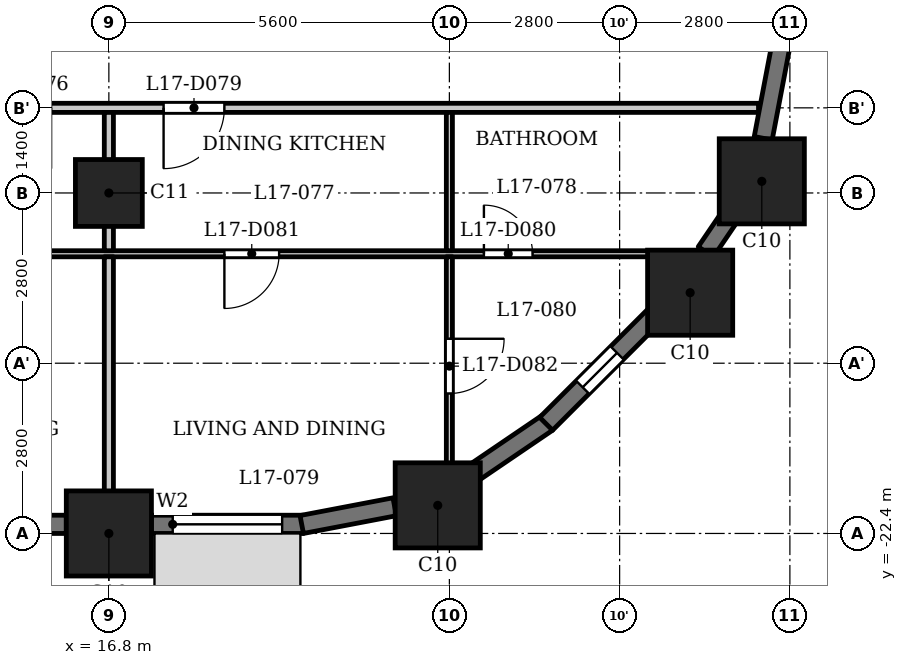
"""IFC4 building model, lengths in metres.
Left out: names, types, materials, properties, quantities, classifications, styles, units other than length and angle.
Written with IfcOpenShell. Run it as: python <this file> out.ifc"""

import sys

from ifc_helpers import new_model, si_unit, direction, frame, frame_2d, origin, origin_2d, place, context, subcontext, project, spatial, rectangle, extrude, element, fill, save


model = new_model("IFC4")
c1 = context("Model", 3, precision=1e-05, world=origin(), true_north=direction((0.0, 1.0)))
c2 = subcontext(c1, "Body", "Model", "MODEL_VIEW")
j1 = project(units=[si_unit("LENGTHUNIT", "METRE"), si_unit("PLANEANGLEUNIT", "RADIAN")], contexts=[c1])
p1 = place(None, origin())
s1 = spatial("IfcSite", under=j1, at=p1, CompositionType="ELEMENT")
p2 = place(p1, origin())
s2 = spatial("IfcBuilding", under=s1, at=p2, CompositionType="ELEMENT")
p3 = place(p2, frame((0.0, 0.0, 69.0)))
s3 = spatial("IfcBuildingStorey", under=s2, at=p3, CompositionType="ELEMENT", Elevation=69.0)
for number, where, z_axis, x_axis in (
    (1, (16.8, -22.4, 0.0), (0.0, 0.0, 1.0), (1.0, 0.0, 0.0)),
    (2, (22.209, -21.938, 0.0), (0.0, 0.0, 1.0), (1.0, 0.0, 0.0)),
    (3, (26.36, -18.44, 0.0), (0.0, 0.0, 1.0), (1.0, 0.0, 0.0)),
    (4, (27.538, -16.609, 0.0), (0.0, 0.0, 1.0), (1.0, 0.0, 0.0)),
):
    element("IfcColumn", number, at=place(p3, frame(where, z_axis=z_axis, x_axis=x_axis)), inside=s3, PredefinedType="COLUMN", context=c2, shape_type="SweptSolid", body=[
        extrude(rectangle(XDim=1.4, YDim=1.4, at=origin_2d()), origin(), (0.0, 0.0, 1.0), 3.5),
    ])
p4 = place(p3, frame((16.8, -16.8, 0.0), z_axis=(0.0, 0.0, 1.0), x_axis=(1.0, 0.0, 0.0)))
e5 = element("IfcColumn", 5, at=p4, inside=s3, PredefinedType="COLUMN", context=c2, shape_type="SweptSolid", body=[
    extrude(rectangle(XDim=1.1, YDim=1.1, at=origin_2d()), origin(), (0.0, 0.0, 1.0), 3.5),
])
p5 = place(p3, frame((11.9, -22.25, 0.0), z_axis=(0.0, 0.0, 1.0), x_axis=(1.0, 0.0, 0.0)))
e6 = element("IfcWall", 6, at=p5, inside=s3, PredefinedType="SOLIDWALL", context=c2, shape_type="SweptSolid", body=[
    extrude(rectangle(XDim=4.2, YDim=0.3, at=frame_2d((2.1, 0.0))), origin(), (0.0, 0.0, 1.0), 2.3),
])
p6 = place(p5, frame((0.3, 0.0, 1.2)))
e7 = element("IfcOpeningElement", 7, at=p6, cuts=e6, PredefinedType="OPENING", context=c2, shape_type="SweptSolid", body=[
    extrude(rectangle(XDim=3.6, YDim=0.95, at=frame_2d((1.8, 0.475))), frame((0.0, 0.16, 0.0), z_axis=(0.0, -1.0, 0.0), x_axis=(1.0, 0.0, 0.0)), (0.0, 0.0, 1.0), 0.32),
])
p7 = place(p3, frame((17.5, -22.25, 0.0), z_axis=(0.0, 0.0, 1.0), x_axis=(1.0, 0.0, 0.0)))
e8 = element("IfcWall", 8, at=p7, inside=s3, PredefinedType="SOLIDWALL", context=c2, shape_type="SweptSolid", body=[
    extrude(rectangle(XDim=2.5, YDim=0.3, at=frame_2d((1.25, 0.0))), origin(), (0.0, 0.0, 1.0), 2.3),
])
p8 = place(p7, frame((0.35, 0.0, 0.9)))
e9 = element("IfcOpeningElement", 9, at=p8, cuts=e8, PredefinedType="OPENING", context=c2, shape_type="SweptSolid", body=[
    extrude(rectangle(XDim=1.8, YDim=1.25, at=frame_2d((0.9, 0.625))), frame((0.0, 0.16, 0.0), z_axis=(0.0, -1.0, 0.0), x_axis=(1.0, 0.0, 0.0)), (0.0, 0.0, 1.0), 0.32),
])
p9 = place(p3, frame((19.972, -22.253, 0.0), z_axis=(0.0, 0.0, 1.0), x_axis=(0.982297345734, 0.187328386968, 0.0)))
e10 = element("IfcWall", 10, at=p9, inside=s3, PredefinedType="SOLIDWALL", context=c2, shape_type="SweptSolid", body=[
    extrude(rectangle(XDim=1.556, YDim=0.3, at=frame_2d((0.778, 0.0))), origin(), (0.0, 0.0, 1.0), 2.3),
])
p10 = place(p3, frame((22.726, -21.454, 0.0), z_axis=(0.0, 0.0, 1.0), x_axis=(0.827019875346, 0.562172683241, 0.0)))
e11 = element("IfcWall", 11, at=p10, inside=s3, PredefinedType="SOLIDWALL", context=c2, shape_type="SweptSolid", body=[
    extrude(rectangle(XDim=1.556, YDim=0.3, at=frame_2d((0.778, 0.0))), origin(), (0.0, 0.0, 1.0), 2.3),
])
p11 = place(p3, frame((23.991, -20.597, 0.0), z_axis=(0.0, 0.0, 1.0), x_axis=(0.707106781187, 0.707106781187, 0.0)))
e12 = element("IfcWall", 12, at=p11, inside=s3, PredefinedType="SOLIDWALL", context=c2, shape_type="SweptSolid", body=[
    extrude(rectangle(XDim=2.5, YDim=0.3, at=frame_2d((1.25, 0.0))), origin(), (0.0, 0.0, 1.0), 2.3),
])
p12 = place(p11, frame((0.85, 0.0, 0.6)))
e13 = element("IfcOpeningElement", 13, at=p12, cuts=e12, PredefinedType="OPENING", context=c2, shape_type="SweptSolid", body=[
    extrude(rectangle(XDim=0.8, YDim=1.55, at=frame_2d((0.4, 0.775))), frame((0.0, 0.16, 0.0), z_axis=(0.0, -1.0, 0.0), x_axis=(1.0, 0.0, 0.0)), (0.0, 0.0, 1.0), 0.32),
])
p13 = place(p3, frame((26.617, -17.769, 0.0), z_axis=(0.0, 0.0, 1.0), x_axis=(0.562000651531, 0.827136788977, 0.0)))
e14 = element("IfcWall", 14, at=p13, inside=s3, PredefinedType="SOLIDWALL", context=c2, shape_type="SweptSolid", body=[
    extrude(rectangle(XDim=0.777, YDim=0.3, at=frame_2d((0.389, 0.0))), origin(), (0.0, 0.0, 1.0), 3.15),
])
p14 = place(p3, frame((27.561, -15.9, 0.0), z_axis=(0.0, 0.0, 1.0), x_axis=(0.187328386968, 0.982297345734, 0.0)))
e15 = element("IfcWall", 15, at=p14, inside=s3, PredefinedType="SOLIDWALL", context=c2, shape_type="SweptSolid", body=[
    extrude(rectangle(XDim=1.556, YDim=0.3, at=frame_2d((0.778, 0.0))), origin(), (0.0, 0.0, 1.0), 2.3),
])
p15 = place(p3, frame((-26.394, -17.8, 0.0), z_axis=(0.0, 0.0, 1.0), x_axis=(1.0, 0.0, 0.0)))
e16 = element("IfcWall", 16, at=p15, inside=s3, PredefinedType="PARTITIONING", context=c2, shape_type="SweptSolid", body=[
    extrude(rectangle(XDim=53.034, YDim=0.1, at=frame_2d((26.517, 0.0))), origin(), (0.0, 0.0, 1.0), 3.15),
])
p16 = place(p15, frame((0.794, 0.0, 0.0)))
e17 = element("IfcOpeningElement", 17, at=p16, cuts=e16, PredefinedType="OPENING", context=c2, shape_type="SweptSolid", body=[
    extrude(rectangle(XDim=0.8, YDim=2.1, at=frame_2d((0.4, 1.05))), frame((0.0, 0.06, 0.0), z_axis=(0.0, -1.0, 0.0), x_axis=(1.0, 0.0, 0.0)), (0.0, 0.0, 1.0), 0.12),
])
p17 = place(p15, frame((5.644, 0.0, 0.0)))
e18 = element("IfcOpeningElement", 18, at=p17, cuts=e16, PredefinedType="OPENING", context=c2, shape_type="SweptSolid", body=[
    extrude(rectangle(XDim=0.9, YDim=2.1, at=frame_2d((0.45, 1.05))), frame((0.0, 0.06, 0.0), z_axis=(0.0, -1.0, 0.0), x_axis=(1.0, 0.0, 0.0)), (0.0, 0.0, 1.0), 0.12),
])
p18 = place(p15, frame((10.494, 0.0, 0.0)))
e19 = element("IfcOpeningElement", 19, at=p18, cuts=e16, PredefinedType="OPENING", context=c2, shape_type="SweptSolid", body=[
    extrude(rectangle(XDim=0.8, YDim=2.1, at=frame_2d((0.4, 1.05))), frame((0.0, 0.06, 0.0), z_axis=(0.0, -1.0, 0.0), x_axis=(1.0, 0.0, 0.0)), (0.0, 0.0, 1.0), 0.12),
])
p19 = place(p15, frame((13.844, 0.0, 0.0)))
e20 = element("IfcOpeningElement", 20, at=p19, cuts=e16, PredefinedType="OPENING", context=c2, shape_type="SweptSolid", body=[
    extrude(rectangle(XDim=0.9, YDim=2.1, at=frame_2d((0.45, 1.05))), frame((0.0, 0.06, 0.0), z_axis=(0.0, -1.0, 0.0), x_axis=(1.0, 0.0, 0.0)), (0.0, 0.0, 1.0), 0.12),
])
p20 = place(p15, frame((19.344, 0.0, 0.0)))
e21 = element("IfcOpeningElement", 21, at=p20, cuts=e16, PredefinedType="OPENING", context=c2, shape_type="SweptSolid", body=[
    extrude(rectangle(XDim=0.8, YDim=2.1, at=frame_2d((0.4, 1.05))), frame((0.0, 0.06, 0.0), z_axis=(0.0, -1.0, 0.0), x_axis=(1.0, 0.0, 0.0)), (0.0, 0.0, 1.0), 0.12),
])
p21 = place(p15, frame((16.094, 0.0, 0.0)))
e22 = element("IfcOpeningElement", 22, at=p21, cuts=e16, PredefinedType="OPENING", context=c2, shape_type="SweptSolid", body=[
    extrude(rectangle(XDim=0.9, YDim=2.1, at=frame_2d((0.45, 1.05))), frame((0.0, 0.06, 0.0), z_axis=(0.0, -1.0, 0.0), x_axis=(1.0, 0.0, 0.0)), (0.0, 0.0, 1.0), 0.12),
])
p22 = place(p15, frame((24.944, 0.0, 0.0)))
e23 = element("IfcOpeningElement", 23, at=p22, cuts=e16, PredefinedType="OPENING", context=c2, shape_type="SweptSolid", body=[
    extrude(rectangle(XDim=0.8, YDim=2.1, at=frame_2d((0.4, 1.05))), frame((0.0, 0.06, 0.0), z_axis=(0.0, -1.0, 0.0), x_axis=(1.0, 0.0, 0.0)), (0.0, 0.0, 1.0), 0.12),
])
p23 = place(p15, frame((22.444, 0.0, 0.0)))
e24 = element("IfcOpeningElement", 24, at=p23, cuts=e16, PredefinedType="OPENING", context=c2, shape_type="SweptSolid", body=[
    extrude(rectangle(XDim=0.9, YDim=2.1, at=frame_2d((0.45, 1.05))), frame((0.0, 0.06, 0.0), z_axis=(0.0, -1.0, 0.0), x_axis=(1.0, 0.0, 0.0)), (0.0, 0.0, 1.0), 0.12),
])
p24 = place(p15, frame((26.944, 0.0, 0.0)))
e25 = element("IfcOpeningElement", 25, at=p24, cuts=e16, PredefinedType="OPENING", context=c2, shape_type="SweptSolid", body=[
    extrude(rectangle(XDim=0.8, YDim=2.1, at=frame_2d((0.4, 1.05))), frame((0.0, 0.06, 0.0), z_axis=(0.0, -1.0, 0.0), x_axis=(1.0, 0.0, 0.0)), (0.0, 0.0, 1.0), 0.12),
])
p25 = place(p15, frame((29.794, 0.0, 0.0)))
e26 = element("IfcOpeningElement", 26, at=p25, cuts=e16, PredefinedType="OPENING", context=c2, shape_type="SweptSolid", body=[
    extrude(rectangle(XDim=0.9, YDim=2.1, at=frame_2d((0.45, 1.05))), frame((0.0, 0.06, 0.0), z_axis=(0.0, -1.0, 0.0), x_axis=(1.0, 0.0, 0.0)), (0.0, 0.0, 1.0), 0.12),
])
p26 = place(p15, frame((33.394, 0.0, 0.0)))
e27 = element("IfcOpeningElement", 27, at=p26, cuts=e16, PredefinedType="OPENING", context=c2, shape_type="SweptSolid", body=[
    extrude(rectangle(XDim=0.9, YDim=2.1, at=frame_2d((0.45, 1.05))), frame((0.0, 0.06, 0.0), z_axis=(0.0, -1.0, 0.0), x_axis=(1.0, 0.0, 0.0)), (0.0, 0.0, 1.0), 0.12),
])
p27 = place(p15, frame((34.944, 0.0, 0.0)))
e28 = element("IfcOpeningElement", 28, at=p27, cuts=e16, PredefinedType="OPENING", context=c2, shape_type="SweptSolid", body=[
    extrude(rectangle(XDim=0.9, YDim=2.1, at=frame_2d((0.45, 1.05))), frame((0.0, 0.06, 0.0), z_axis=(0.0, -1.0, 0.0), x_axis=(1.0, 0.0, 0.0)), (0.0, 0.0, 1.0), 0.12),
])
p28 = place(p15, frame((38.144, 0.0, 0.0)))
e29 = element("IfcOpeningElement", 29, at=p28, cuts=e16, PredefinedType="OPENING", context=c2, shape_type="SweptSolid", body=[
    extrude(rectangle(XDim=0.8, YDim=2.1, at=frame_2d((0.4, 1.05))), frame((0.0, 0.06, 0.0), z_axis=(0.0, -1.0, 0.0), x_axis=(1.0, 0.0, 0.0)), (0.0, 0.0, 1.0), 0.12),
])
p29 = place(p15, frame((40.244, 0.0, 0.0)))
e30 = element("IfcOpeningElement", 30, at=p29, cuts=e16, PredefinedType="OPENING", context=c2, shape_type="SweptSolid", body=[
    extrude(rectangle(XDim=0.9, YDim=2.1, at=frame_2d((0.45, 1.05))), frame((0.0, 0.06, 0.0), z_axis=(0.0, -1.0, 0.0), x_axis=(1.0, 0.0, 0.0)), (0.0, 0.0, 1.0), 0.12),
])
p30 = place(p15, frame((49.362, 0.0, 0.0)))
e31 = element("IfcOpeningElement", 31, at=p30, cuts=e16, PredefinedType="OPENING", context=c2, shape_type="SweptSolid", body=[
    extrude(rectangle(XDim=0.8, YDim=2.1, at=frame_2d((0.4, 1.05))), frame((0.0, 0.06, 0.0), z_axis=(0.0, -1.0, 0.0), x_axis=(1.0, 0.0, 0.0)), (0.0, 0.0, 1.0), 0.12),
])
p31 = place(p15, frame((45.094, 0.0, 0.0)))
e32 = element("IfcOpeningElement", 32, at=p31, cuts=e16, PredefinedType="OPENING", context=c2, shape_type="SweptSolid", body=[
    extrude(rectangle(XDim=0.9, YDim=2.1, at=frame_2d((0.45, 1.05))), frame((0.0, 0.06, 0.0), z_axis=(0.0, -1.0, 0.0), x_axis=(1.0, 0.0, 0.0)), (0.0, 0.0, 1.0), 0.12),
])
p32 = place(p3, frame((-27.484, -15.4, 0.0), z_axis=(0.0, 0.0, 1.0), x_axis=(1.0, 0.0, 0.0)))
e33 = element("IfcWall", 33, at=p32, inside=s3, PredefinedType="PARTITIONING", context=c2, shape_type="SweptSolid", body=[
    extrude(rectangle(XDim=54.968, YDim=0.15, at=frame_2d((27.484, 0.0))), origin(), (0.0, 0.0, 1.0), 3.15),
])
p33 = place(p32, frame((5.734, 0.0, 0.0)))
e34 = element("IfcOpeningElement", 34, at=p33, cuts=e33, PredefinedType="OPENING", context=c2, shape_type="SweptSolid", body=[
    extrude(rectangle(XDim=1.0, YDim=2.1, at=frame_2d((0.5, 1.05))), frame((0.0, 0.085, 0.0), z_axis=(0.0, -1.0, 0.0), x_axis=(1.0, 0.0, 0.0)), (0.0, 0.0, 1.0), 0.17),
])
p34 = place(p32, frame((13.934, 0.0, 0.0)))
e35 = element("IfcOpeningElement", 35, at=p34, cuts=e33, PredefinedType="OPENING", context=c2, shape_type="SweptSolid", body=[
    extrude(rectangle(XDim=1.0, YDim=2.1, at=frame_2d((0.5, 1.05))), frame((0.0, 0.085, 0.0), z_axis=(0.0, -1.0, 0.0), x_axis=(1.0, 0.0, 0.0)), (0.0, 0.0, 1.0), 0.17),
])
p35 = place(p32, frame((18.184, 0.0, 0.0)))
e36 = element("IfcOpeningElement", 36, at=p35, cuts=e33, PredefinedType="OPENING", context=c2, shape_type="SweptSolid", body=[
    extrude(rectangle(XDim=1.0, YDim=2.1, at=frame_2d((0.5, 1.05))), frame((0.0, 0.085, 0.0), z_axis=(0.0, -1.0, 0.0), x_axis=(1.0, 0.0, 0.0)), (0.0, 0.0, 1.0), 0.17),
])
p36 = place(p32, frame((22.534, 0.0, 0.0)))
e37 = element("IfcOpeningElement", 37, at=p36, cuts=e33, PredefinedType="OPENING", context=c2, shape_type="SweptSolid", body=[
    extrude(rectangle(XDim=1.0, YDim=2.1, at=frame_2d((0.5, 1.05))), frame((0.0, 0.085, 0.0), z_axis=(0.0, -1.0, 0.0), x_axis=(1.0, 0.0, 0.0)), (0.0, 0.0, 1.0), 0.17),
])
p37 = place(p32, frame((36.984, 0.0, 0.0)))
e38 = element("IfcOpeningElement", 38, at=p37, cuts=e33, PredefinedType="OPENING", context=c2, shape_type="SweptSolid", body=[
    extrude(rectangle(XDim=1.0, YDim=2.1, at=frame_2d((0.5, 1.05))), frame((0.0, 0.085, 0.0), z_axis=(0.0, -1.0, 0.0), x_axis=(1.0, 0.0, 0.0)), (0.0, 0.0, 1.0), 0.17),
])
p38 = place(p32, frame((42.334, 0.0, 0.0)))
e39 = element("IfcOpeningElement", 39, at=p38, cuts=e33, PredefinedType="OPENING", context=c2, shape_type="SweptSolid", body=[
    extrude(rectangle(XDim=1.0, YDim=2.1, at=frame_2d((0.5, 1.05))), frame((0.0, 0.085, 0.0), z_axis=(0.0, -1.0, 0.0), x_axis=(1.0, 0.0, 0.0)), (0.0, 0.0, 1.0), 0.17),
])
p39 = place(p32, frame((45.184, 0.0, 0.0)))
e40 = element("IfcOpeningElement", 40, at=p39, cuts=e33, PredefinedType="OPENING", context=c2, shape_type="SweptSolid", body=[
    extrude(rectangle(XDim=1.0, YDim=2.1, at=frame_2d((0.5, 1.05))), frame((0.0, 0.085, 0.0), z_axis=(0.0, -1.0, 0.0), x_axis=(1.0, 0.0, 0.0)), (0.0, 0.0, 1.0), 0.17),
])
p40 = place(p3, frame((16.8, -23.08, 0.0), z_axis=(0.0, 0.0, 1.0), x_axis=(0.0, 1.0, 0.0)))
e41 = element("IfcWall", 41, at=p40, inside=s3, PredefinedType="PARTITIONING", context=c2, shape_type="SweptSolid", body=[
    extrude(rectangle(XDim=5.23, YDim=0.15, at=frame_2d((2.615, 0.0))), origin(), (0.0, 0.0, 1.0), 3.15),
])
p41 = place(p3, frame((16.8, -17.75, 0.0), z_axis=(0.0, 0.0, 1.0), x_axis=(0.0, 1.0, 0.0)))
e42 = element("IfcWall", 42, at=p41, inside=s3, PredefinedType="PARTITIONING", context=c2, shape_type="SweptSolid", body=[
    extrude(rectangle(XDim=2.275, YDim=0.15, at=frame_2d((1.137, 0.0))), origin(), (0.0, 0.0, 1.0), 3.15),
])
p42 = place(p3, frame((22.4, -21.72, 0.0), z_axis=(0.0, 0.0, 1.0), x_axis=(0.0, 1.0, 0.0)))
e43 = element("IfcWall", 43, at=p42, inside=s3, PredefinedType="PARTITIONING", context=c2, shape_type="SweptSolid", body=[
    extrude(rectangle(XDim=3.87, YDim=0.1, at=frame_2d((1.935, 0.0))), origin(), (0.0, 0.0, 1.0), 3.15),
])
p43 = place(p42, frame((1.622, 0.0, 0.0)))
e44 = element("IfcOpeningElement", 44, at=p43, cuts=e43, PredefinedType="OPENING", context=c2, shape_type="SweptSolid", body=[
    extrude(rectangle(XDim=0.9, YDim=2.1, at=frame_2d((0.45, 1.05))), frame((0.0, 0.06, 0.0), z_axis=(0.0, -1.0, 0.0), x_axis=(1.0, 0.0, 0.0)), (0.0, 0.0, 1.0), 0.12),
])
p44 = place(p3, frame((22.4, -17.75, 0.0), z_axis=(0.0, 0.0, 1.0), x_axis=(0.0, 1.0, 0.0)))
e45 = element("IfcWall", 45, at=p44, inside=s3, PredefinedType="PARTITIONING", context=c2, shape_type="SweptSolid", body=[
    extrude(rectangle(XDim=2.275, YDim=0.1, at=frame_2d((1.137, 0.0))), origin(), (0.0, 0.0, 1.0), 3.15),
])
p45 = place(p39, origin())
e46 = element("IfcDoor", 46, at=p45, inside=s3, OperationType="SINGLE_SWING_LEFT", PredefinedType="DOOR", context=c2, shape_type="SweptSolid", body=[
    extrude(rectangle(XDim=1.0, YDim=2.1, at=frame_2d((0.5, 1.05))), frame((0.0, 0.025, 0.0), z_axis=(0.0, -1.0, 0.0), x_axis=(1.0, 0.0, 0.0)), (0.0, 0.0, 1.0), 0.05),
])
fill(e40, e46)
p46 = place(p30, origin())
e47 = element("IfcDoor", 47, at=p46, inside=s3, OperationType="SINGLE_SWING_RIGHT", PredefinedType="DOOR", context=c2, shape_type="SweptSolid", body=[
    extrude(rectangle(XDim=0.8, YDim=2.1, at=frame_2d((0.4, 1.05))), frame((0.0, 0.025, 0.0), z_axis=(0.0, -1.0, 0.0), x_axis=(1.0, 0.0, 0.0)), (0.0, 0.0, 1.0), 0.05),
])
fill(e31, e47)
p47 = place(p31, origin())
e48 = element("IfcDoor", 48, at=p47, inside=s3, OperationType="SINGLE_SWING_LEFT", PredefinedType="DOOR", context=c2, shape_type="SweptSolid", body=[
    extrude(rectangle(XDim=0.9, YDim=2.1, at=frame_2d((0.45, 1.05))), frame((0.0, 0.025, 0.0), z_axis=(0.0, -1.0, 0.0), x_axis=(1.0, 0.0, 0.0)), (0.0, 0.0, 1.0), 0.05),
])
fill(e32, e48)
p48 = place(p43, origin())
e49 = element("IfcDoor", 49, at=p48, inside=s3, OperationType="SINGLE_SWING_RIGHT", PredefinedType="DOOR", context=c2, shape_type="SweptSolid", body=[
    extrude(rectangle(XDim=0.9, YDim=2.1, at=frame_2d((0.45, 1.05))), frame((0.0, 0.025, 0.0), z_axis=(0.0, -1.0, 0.0), x_axis=(1.0, 0.0, 0.0)), (0.0, 0.0, 1.0), 0.05),
])
fill(e44, e49)
p49 = place(p8, origin())
e50 = element("IfcWindow", 50, at=p49, inside=s3, PartitioningType="SINGLE_PANEL", PredefinedType="WINDOW", context=c2, shape_type="SweptSolid", body=[
    extrude(rectangle(XDim=1.8, YDim=1.25, at=frame_2d((0.9, 0.625))), frame((0.0, 0.03, 0.0), z_axis=(0.0, -1.0, 0.0), x_axis=(1.0, 0.0, 0.0)), (0.0, 0.0, 1.0), 0.06),
])
fill(e9, e50)
p50 = place(p12, origin())
e51 = element("IfcWindow", 51, at=p50, inside=s3, PartitioningType="SINGLE_PANEL", PredefinedType="WINDOW", context=c2, shape_type="SweptSolid", body=[
    extrude(rectangle(XDim=0.8, YDim=1.55, at=frame_2d((0.4, 0.775))), frame((0.0, 0.03, 0.0), z_axis=(0.0, -1.0, 0.0), x_axis=(1.0, 0.0, 0.0)), (0.0, 0.0, 1.0), 0.06),
])
fill(e13, e51)
save(model, sys.argv[1])
